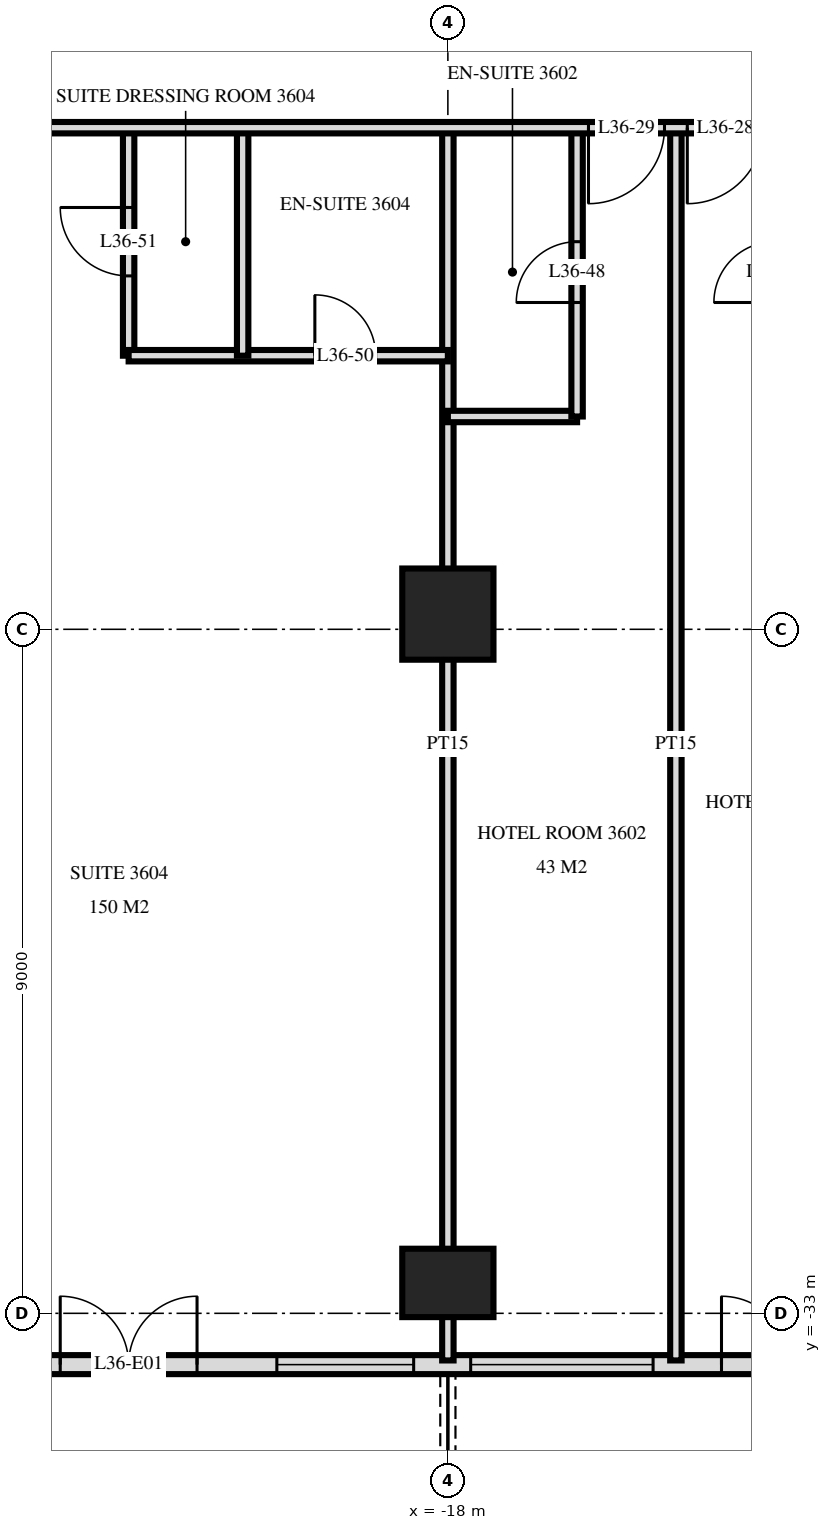
"""IFC4 building model, lengths in metres.
Left out: names, types, materials, properties, quantities, classifications, styles, units other than length and angle.
Written with IfcOpenShell. Run it as: python <this file> out.ifc"""

import sys

from ifc_helpers import new_model, si_unit, direction, frame, frame_2d, origin, origin_2d, place, context, subcontext, project, spatial, rectangle, extrude, element, fill, save


model = new_model("IFC4")
c1 = context("Model", 3, precision=1e-05, world=origin(), true_north=direction((0.0, 1.0)))
c2 = subcontext(c1, "Body", "Model", "MODEL_VIEW")
j1 = project(units=[si_unit("LENGTHUNIT", "METRE"), si_unit("PLANEANGLEUNIT", "RADIAN")], contexts=[c1])
p1 = place(None, origin())
s1 = spatial("IfcSite", under=j1, at=p1, CompositionType="ELEMENT")
p2 = place(p1, origin())
s2 = spatial("IfcBuilding", under=s1, at=p2, CompositionType="ELEMENT")
p3 = place(p2, frame((0.0, 0.0, 141.6)))
s3 = spatial("IfcBuildingStorey", under=s2, at=p3, CompositionType="ELEMENT", Elevation=141.6)
p4 = place(p3, frame((-18.0, -32.6, 0.0), z_axis=(0.0, 0.0, 1.0), x_axis=(1.0, 0.0, 0.0)))
e1 = element("IfcColumn", 1, at=p4, inside=s3, PredefinedType="COLUMN", context=c2, shape_type="SweptSolid", body=[
    extrude(rectangle(XDim=1.2, YDim=0.9, at=origin_2d()), origin(), (0.0, 0.0, 1.0), 3.6),
])
p5 = place(p3, frame((-18.0, -23.8, 0.0), z_axis=(0.0, 0.0, 1.0), x_axis=(1.0, 0.0, 0.0)))
e2 = element("IfcColumn", 2, at=p5, inside=s3, PredefinedType="COLUMN", context=c2, shape_type="SweptSolid", body=[
    extrude(rectangle(XDim=1.2, YDim=1.2, at=origin_2d()), origin(), (0.0, 0.0, 1.0), 3.6),
])
p6 = place(p3, frame((-23.675, -33.675, 0.0), z_axis=(0.0, 0.0, 1.0), x_axis=(1.0, 0.0, 0.0)))
e3 = element("IfcWall", 3, at=p6, inside=s3, PredefinedType="SOLIDWALL", context=c2, shape_type="SweptSolid", body=[
    extrude(rectangle(XDim=47.351, YDim=0.25, at=frame_2d((23.675, 0.0))), origin(), (0.0, 0.0, 1.0), 3.32),
])
p7 = place(p6, frame((0.575, 0.0, 0.0)))
e4 = element("IfcOpeningElement", 4, at=p7, cuts=e3, PredefinedType="OPENING", context=c2, shape_type="SweptSolid", body=[
    extrude(rectangle(XDim=1.8, YDim=2.4, at=frame_2d((0.9, 1.2))), frame((0.0, 0.135, 0.0), z_axis=(0.0, -1.0, 0.0), x_axis=(1.0, 0.0, 0.0)), (0.0, 0.0, 1.0), 0.27),
])
p8 = place(p6, frame((3.425, 0.0, 0.3)))
e5 = element("IfcOpeningElement", 5, at=p8, cuts=e3, PredefinedType="OPENING", context=c2, shape_type="SweptSolid", body=[
    extrude(rectangle(XDim=1.8, YDim=2.1, at=frame_2d((0.9, 1.05))), frame((0.0, 0.135, 0.0), z_axis=(0.0, -1.0, 0.0), x_axis=(1.0, 0.0, 0.0)), (0.0, 0.0, 1.0), 0.27),
])
p9 = place(p6, frame((5.975, 0.0, 0.3)))
e6 = element("IfcOpeningElement", 6, at=p9, cuts=e3, PredefinedType="OPENING", context=c2, shape_type="SweptSolid", body=[
    extrude(rectangle(XDim=2.4, YDim=2.1, at=frame_2d((1.2, 1.05))), frame((0.0, 0.135, 0.0), z_axis=(0.0, -1.0, 0.0), x_axis=(1.0, 0.0, 0.0)), (0.0, 0.0, 1.0), 0.27),
])
p10 = place(p6, frame((9.275, 0.0, 0.0)))
e7 = element("IfcOpeningElement", 7, at=p10, cuts=e3, PredefinedType="OPENING", context=c2, shape_type="SweptSolid", body=[
    extrude(rectangle(XDim=1.8, YDim=2.4, at=frame_2d((0.9, 1.2))), frame((0.0, 0.135, 0.0), z_axis=(0.0, -1.0, 0.0), x_axis=(1.0, 0.0, 0.0)), (0.0, 0.0, 1.0), 0.27),
])
p11 = place(p6, frame((12.275, 0.0, 0.0)))
e8 = element("IfcOpeningElement", 8, at=p11, cuts=e3, PredefinedType="OPENING", context=c2, shape_type="SweptSolid", body=[
    extrude(rectangle(XDim=1.8, YDim=2.4, at=frame_2d((0.9, 1.2))), frame((0.0, 0.135, 0.0), z_axis=(0.0, -1.0, 0.0), x_axis=(1.0, 0.0, 0.0)), (0.0, 0.0, 1.0), 0.27),
])
p12 = place(p6, frame((14.975, 0.0, 0.3)))
e9 = element("IfcOpeningElement", 9, at=p12, cuts=e3, PredefinedType="OPENING", context=c2, shape_type="SweptSolid", body=[
    extrude(rectangle(XDim=2.4, YDim=2.1, at=frame_2d((1.2, 1.05))), frame((0.0, 0.135, 0.0), z_axis=(0.0, -1.0, 0.0), x_axis=(1.0, 0.0, 0.0)), (0.0, 0.0, 1.0), 0.27),
])
p13 = place(p6, frame((17.975, 0.0, 0.3)))
e10 = element("IfcOpeningElement", 10, at=p13, cuts=e3, PredefinedType="OPENING", context=c2, shape_type="SweptSolid", body=[
    extrude(rectangle(XDim=2.4, YDim=2.1, at=frame_2d((1.2, 1.05))), frame((0.0, 0.135, 0.0), z_axis=(0.0, -1.0, 0.0), x_axis=(1.0, 0.0, 0.0)), (0.0, 0.0, 1.0), 0.27),
])
p14 = place(p6, frame((21.275, 0.0, 0.0)))
e11 = element("IfcOpeningElement", 11, at=p14, cuts=e3, PredefinedType="OPENING", context=c2, shape_type="SweptSolid", body=[
    extrude(rectangle(XDim=1.8, YDim=2.4, at=frame_2d((0.9, 1.2))), frame((0.0, 0.135, 0.0), z_axis=(0.0, -1.0, 0.0), x_axis=(1.0, 0.0, 0.0)), (0.0, 0.0, 1.0), 0.27),
])
p15 = place(p6, frame((24.275, 0.0, 0.0)))
e12 = element("IfcOpeningElement", 12, at=p15, cuts=e3, PredefinedType="OPENING", context=c2, shape_type="SweptSolid", body=[
    extrude(rectangle(XDim=1.8, YDim=2.4, at=frame_2d((0.9, 1.2))), frame((0.0, 0.135, 0.0), z_axis=(0.0, -1.0, 0.0), x_axis=(1.0, 0.0, 0.0)), (0.0, 0.0, 1.0), 0.27),
])
p16 = place(p6, frame((26.975, 0.0, 0.3)))
e13 = element("IfcOpeningElement", 13, at=p16, cuts=e3, PredefinedType="OPENING", context=c2, shape_type="SweptSolid", body=[
    extrude(rectangle(XDim=2.4, YDim=2.1, at=frame_2d((1.2, 1.05))), frame((0.0, 0.135, 0.0), z_axis=(0.0, -1.0, 0.0), x_axis=(1.0, 0.0, 0.0)), (0.0, 0.0, 1.0), 0.27),
])
p17 = place(p6, frame((30.275, 0.0, 0.0)))
e14 = element("IfcOpeningElement", 14, at=p17, cuts=e3, PredefinedType="OPENING", context=c2, shape_type="SweptSolid", body=[
    extrude(rectangle(XDim=1.8, YDim=2.4, at=frame_2d((0.9, 1.2))), frame((0.0, 0.135, 0.0), z_axis=(0.0, -1.0, 0.0), x_axis=(1.0, 0.0, 0.0)), (0.0, 0.0, 1.0), 0.27),
])
p18 = place(p6, frame((32.975, 0.0, 0.3)))
e15 = element("IfcOpeningElement", 15, at=p18, cuts=e3, PredefinedType="OPENING", context=c2, shape_type="SweptSolid", body=[
    extrude(rectangle(XDim=2.4, YDim=2.1, at=frame_2d((1.2, 1.05))), frame((0.0, 0.135, 0.0), z_axis=(0.0, -1.0, 0.0), x_axis=(1.0, 0.0, 0.0)), (0.0, 0.0, 1.0), 0.27),
])
p19 = place(p6, frame((36.275, 0.0, 0.0)))
e16 = element("IfcOpeningElement", 16, at=p19, cuts=e3, PredefinedType="OPENING", context=c2, shape_type="SweptSolid", body=[
    extrude(rectangle(XDim=1.8, YDim=2.4, at=frame_2d((0.9, 1.2))), frame((0.0, 0.135, 0.0), z_axis=(0.0, -1.0, 0.0), x_axis=(1.0, 0.0, 0.0)), (0.0, 0.0, 1.0), 0.27),
])
p20 = place(p6, frame((38.975, 0.0, 0.3)))
e17 = element("IfcOpeningElement", 17, at=p20, cuts=e3, PredefinedType="OPENING", context=c2, shape_type="SweptSolid", body=[
    extrude(rectangle(XDim=2.4, YDim=2.1, at=frame_2d((1.2, 1.05))), frame((0.0, 0.135, 0.0), z_axis=(0.0, -1.0, 0.0), x_axis=(1.0, 0.0, 0.0)), (0.0, 0.0, 1.0), 0.27),
])
p21 = place(p6, frame((42.275, 0.0, 0.0)))
e18 = element("IfcOpeningElement", 18, at=p21, cuts=e3, PredefinedType="OPENING", context=c2, shape_type="SweptSolid", body=[
    extrude(rectangle(XDim=1.8, YDim=2.4, at=frame_2d((0.9, 1.2))), frame((0.0, 0.135, 0.0), z_axis=(0.0, -1.0, 0.0), x_axis=(1.0, 0.0, 0.0)), (0.0, 0.0, 1.0), 0.27),
])
p22 = place(p6, frame((45.125, 0.0, 0.3)))
e19 = element("IfcOpeningElement", 19, at=p22, cuts=e3, PredefinedType="OPENING", context=c2, shape_type="SweptSolid", body=[
    extrude(rectangle(XDim=1.8, YDim=2.1, at=frame_2d((0.9, 1.05))), frame((0.0, 0.135, 0.0), z_axis=(0.0, -1.0, 0.0), x_axis=(1.0, 0.0, 0.0)), (0.0, 0.0, 1.0), 0.27),
])
p23 = place(p3, frame((-15.0, -33.62, 0.0), z_axis=(0.0, 0.0, 1.0), x_axis=(0.0, 1.0, 0.0)))
e20 = element("IfcWall", 20, at=p23, inside=s3, PredefinedType="PARTITIONING", context=c2, shape_type="SweptSolid", body=[
    extrude(rectangle(XDim=16.22, YDim=0.15, at=frame_2d((8.11, 0.0))), origin(), (0.0, 0.0, 1.0), 3.32),
])
p24 = place(p3, frame((-16.3, -21.2, 0.0), z_axis=(0.0, 0.0, 1.0), x_axis=(0.0, 1.0, 0.0)))
e21 = element("IfcWall", 21, at=p24, inside=s3, PredefinedType="PARTITIONING", context=c2, shape_type="SweptSolid", body=[
    extrude(rectangle(XDim=3.8, YDim=0.15, at=frame_2d((1.9, 0.0))), origin(), (0.0, 0.0, 1.0), 3.32),
])
p25 = place(p24, frame((1.5, 0.0, 0.0)))
e22 = element("IfcOpeningElement", 22, at=p25, cuts=e21, PredefinedType="OPENING", context=c2, shape_type="SweptSolid", body=[
    extrude(rectangle(XDim=0.8, YDim=2.1, at=frame_2d((0.4, 1.05))), frame((0.0, 0.085, 0.0), z_axis=(0.0, -1.0, 0.0), x_axis=(1.0, 0.0, 0.0)), (0.0, 0.0, 1.0), 0.17),
])
p26 = place(p3, frame((-18.0, -33.62, 0.0), z_axis=(0.0, 0.0, 1.0), x_axis=(0.0, 1.0, 0.0)))
e23 = element("IfcWall", 23, at=p26, inside=s3, PredefinedType="PARTITIONING", context=c2, shape_type="SweptSolid", body=[
    extrude(rectangle(XDim=16.22, YDim=0.15, at=frame_2d((8.11, 0.0))), origin(), (0.0, 0.0, 1.0), 3.32),
])
p27 = place(p3, frame((-20.7, -20.4, 0.0), z_axis=(0.0, 0.0, 1.0), x_axis=(0.0, 1.0, 0.0)))
e24 = element("IfcWall", 24, at=p27, inside=s3, PredefinedType="PARTITIONING", context=c2, shape_type="SweptSolid", body=[
    extrude(rectangle(XDim=3.0, YDim=0.15, at=frame_2d((1.5, 0.0))), origin(), (0.0, 0.0, 1.0), 3.32),
])
p28 = place(p3, frame((-22.2, -20.4, 0.0), z_axis=(0.0, 0.0, 1.0), x_axis=(0.0, 1.0, 0.0)))
e25 = element("IfcWall", 25, at=p28, inside=s3, PredefinedType="PARTITIONING", context=c2, shape_type="SweptSolid", body=[
    extrude(rectangle(XDim=3.0, YDim=0.15, at=frame_2d((1.5, 0.0))), origin(), (0.0, 0.0, 1.0), 3.32),
])
p29 = place(p28, frame((1.05, 0.0, 0.0)))
e26 = element("IfcOpeningElement", 26, at=p29, cuts=e25, PredefinedType="OPENING", context=c2, shape_type="SweptSolid", body=[
    extrude(rectangle(XDim=0.9, YDim=2.1, at=frame_2d((0.45, 1.05))), frame((0.0, 0.085, 0.0), z_axis=(0.0, -1.0, 0.0), x_axis=(1.0, 0.0, 0.0)), (0.0, 0.0, 1.0), 0.17),
])
p30 = place(p3, frame((-18.0, -21.2, 0.0), z_axis=(0.0, 0.0, 1.0), x_axis=(1.0, 0.0, 0.0)))
e27 = element("IfcWall", 27, at=p30, inside=s3, PredefinedType="PARTITIONING", context=c2, shape_type="SweptSolid", body=[
    extrude(rectangle(XDim=1.7, YDim=0.15, at=frame_2d((0.85, 0.0))), origin(), (0.0, 0.0, 1.0), 3.32),
])
p31 = place(p3, frame((-22.2, -20.4, 0.0), z_axis=(0.0, 0.0, 1.0), x_axis=(1.0, 0.0, 0.0)))
e28 = element("IfcWall", 28, at=p31, inside=s3, PredefinedType="PARTITIONING", context=c2, shape_type="SweptSolid", body=[
    extrude(rectangle(XDim=4.2, YDim=0.15, at=frame_2d((2.1, 0.0))), origin(), (0.0, 0.0, 1.0), 3.32),
])
p32 = place(p31, frame((2.45, 0.0, 0.0)))
e29 = element("IfcOpeningElement", 29, at=p32, cuts=e28, PredefinedType="OPENING", context=c2, shape_type="SweptSolid", body=[
    extrude(rectangle(XDim=0.8, YDim=2.1, at=frame_2d((0.4, 1.05))), frame((0.0, 0.085, 0.0), z_axis=(0.0, -1.0, 0.0), x_axis=(1.0, 0.0, 0.0)), (0.0, 0.0, 1.0), 0.17),
])
p33 = place(p3, frame((-28.02, -17.4, 0.0), z_axis=(0.0, 0.0, 1.0), x_axis=(1.0, 0.0, 0.0)))
e30 = element("IfcWall", 30, at=p33, inside=s3, PredefinedType="PARTITIONING", context=c2, shape_type="SweptSolid", body=[
    extrude(rectangle(XDim=56.04, YDim=0.15, at=frame_2d((28.02, 0.0))), origin(), (0.0, 0.0, 1.0), 3.32),
])
p34 = place(p33, frame((13.17, 0.0, 0.0)))
e31 = element("IfcOpeningElement", 31, at=p34, cuts=e30, PredefinedType="OPENING", context=c2, shape_type="SweptSolid", body=[
    extrude(rectangle(XDim=1.0, YDim=2.1, at=frame_2d((0.5, 1.05))), frame((0.0, 0.085, 0.0), z_axis=(0.0, -1.0, 0.0), x_axis=(1.0, 0.0, 0.0)), (0.0, 0.0, 1.0), 0.17),
])
p35 = place(p33, frame((11.87, 0.0, 0.0)))
e32 = element("IfcOpeningElement", 32, at=p35, cuts=e30, PredefinedType="OPENING", context=c2, shape_type="SweptSolid", body=[
    extrude(rectangle(XDim=1.0, YDim=2.1, at=frame_2d((0.5, 1.05))), frame((0.0, 0.085, 0.0), z_axis=(0.0, -1.0, 0.0), x_axis=(1.0, 0.0, 0.0)), (0.0, 0.0, 1.0), 0.17),
])
p36 = place(p33, frame((2.32, 0.0, 0.0)))
e33 = element("IfcOpeningElement", 33, at=p36, cuts=e30, PredefinedType="OPENING", context=c2, shape_type="SweptSolid", body=[
    extrude(rectangle(XDim=1.0, YDim=2.1, at=frame_2d((0.5, 1.05))), frame((0.0, 0.085, 0.0), z_axis=(0.0, -1.0, 0.0), x_axis=(1.0, 0.0, 0.0)), (0.0, 0.0, 1.0), 0.17),
])
p37 = place(p33, frame((40.17, 0.0, 0.0)))
e34 = element("IfcOpeningElement", 34, at=p37, cuts=e30, PredefinedType="OPENING", context=c2, shape_type="SweptSolid", body=[
    extrude(rectangle(XDim=1.0, YDim=2.1, at=frame_2d((0.5, 1.05))), frame((0.0, 0.085, 0.0), z_axis=(0.0, -1.0, 0.0), x_axis=(1.0, 0.0, 0.0)), (0.0, 0.0, 1.0), 0.17),
])
p38 = place(p33, frame((51.22, 0.0, 0.0)))
e35 = element("IfcOpeningElement", 35, at=p38, cuts=e30, PredefinedType="OPENING", context=c2, shape_type="SweptSolid", body=[
    extrude(rectangle(XDim=1.0, YDim=2.1, at=frame_2d((0.5, 1.05))), frame((0.0, 0.085, 0.0), z_axis=(0.0, -1.0, 0.0), x_axis=(1.0, 0.0, 0.0)), (0.0, 0.0, 1.0), 0.17),
])
p39 = place(p33, frame((18.52, 0.0, 0.0)))
e36 = element("IfcOpeningElement", 36, at=p39, cuts=e30, PredefinedType="OPENING", context=c2, shape_type="SweptSolid", body=[
    extrude(rectangle(XDim=1.0, YDim=2.1, at=frame_2d((0.5, 1.05))), frame((0.0, 0.085, 0.0), z_axis=(0.0, -1.0, 0.0), x_axis=(1.0, 0.0, 0.0)), (0.0, 0.0, 1.0), 0.17),
])
p40 = place(p33, frame((26.02, 0.0, 0.0)))
e37 = element("IfcOpeningElement", 37, at=p40, cuts=e30, PredefinedType="OPENING", context=c2, shape_type="SweptSolid", body=[
    extrude(rectangle(XDim=1.0, YDim=2.1, at=frame_2d((0.5, 1.05))), frame((0.0, 0.085, 0.0), z_axis=(0.0, -1.0, 0.0), x_axis=(1.0, 0.0, 0.0)), (0.0, 0.0, 1.0), 0.17),
])
p41 = place(p33, frame((35.02, 0.0, 0.0)))
e38 = element("IfcOpeningElement", 38, at=p41, cuts=e30, PredefinedType="OPENING", context=c2, shape_type="SweptSolid", body=[
    extrude(rectangle(XDim=1.0, YDim=2.1, at=frame_2d((0.5, 1.05))), frame((0.0, 0.085, 0.0), z_axis=(0.0, -1.0, 0.0), x_axis=(1.0, 0.0, 0.0)), (0.0, 0.0, 1.0), 0.17),
])
p42 = place(p7, origin())
e39 = element("IfcDoor", 39, at=p42, inside=s3, OperationType="DOUBLE_DOOR_SINGLE_SWING", PredefinedType="DOOR", context=c2, shape_type="SweptSolid", body=[
    extrude(rectangle(XDim=1.8, YDim=2.4, at=frame_2d((0.9, 1.2))), frame((0.0, 0.025, 0.0), z_axis=(0.0, -1.0, 0.0), x_axis=(1.0, 0.0, 0.0)), (0.0, 0.0, 1.0), 0.05),
])
fill(e4, e39)
p43 = place(p8, origin())
e40 = element("IfcWindow", 40, at=p43, inside=s3, PartitioningType="SINGLE_PANEL", PredefinedType="WINDOW", context=c2, shape_type="SweptSolid", body=[
    extrude(rectangle(XDim=1.8, YDim=2.1, at=frame_2d((0.9, 1.05))), frame((0.0, 0.03, 0.0), z_axis=(0.0, -1.0, 0.0), x_axis=(1.0, 0.0, 0.0)), (0.0, 0.0, 1.0), 0.06),
])
fill(e5, e40)
p44 = place(p9, origin())
e41 = element("IfcWindow", 41, at=p44, inside=s3, PartitioningType="SINGLE_PANEL", PredefinedType="WINDOW", context=c2, shape_type="SweptSolid", body=[
    extrude(rectangle(XDim=2.4, YDim=2.1, at=frame_2d((1.2, 1.05))), frame((0.0, 0.03, 0.0), z_axis=(0.0, -1.0, 0.0), x_axis=(1.0, 0.0, 0.0)), (0.0, 0.0, 1.0), 0.06),
])
fill(e6, e41)
p45 = place(p10, origin())
e42 = element("IfcDoor", 42, at=p45, inside=s3, OperationType="DOUBLE_DOOR_SINGLE_SWING", PredefinedType="DOOR", context=c2, shape_type="SweptSolid", body=[
    extrude(rectangle(XDim=1.8, YDim=2.4, at=frame_2d((0.9, 1.2))), frame((0.0, 0.025, 0.0), z_axis=(0.0, -1.0, 0.0), x_axis=(1.0, 0.0, 0.0)), (0.0, 0.0, 1.0), 0.05),
])
fill(e7, e42)
p46 = place(p34, frame((0.5, 0.0, 0.0), z_axis=(0.0, 0.0, 1.0), x_axis=(-1.0, 0.0, 0.0)))
e43 = element("IfcDoor", 43, at=p46, inside=s3, OperationType="SINGLE_SWING_LEFT", PredefinedType="DOOR", context=c2, shape_type="SweptSolid", body=[
    extrude(rectangle(XDim=1.0, YDim=2.1, at=frame_2d((0.0, 1.05))), frame((0.0, -0.025, 0.0), z_axis=(0.0, 1.0, 0.0), x_axis=(-1.0, 0.0, 0.0)), (0.0, 0.0, 1.0), 0.05),
])
fill(e31, e43)
p47 = place(p35, frame((0.5, 0.0, 0.0), z_axis=(0.0, 0.0, 1.0), x_axis=(-1.0, 0.0, 0.0)))
e44 = element("IfcDoor", 44, at=p47, inside=s3, OperationType="SINGLE_SWING_LEFT", PredefinedType="DOOR", context=c2, shape_type="SweptSolid", body=[
    extrude(rectangle(XDim=1.0, YDim=2.1, at=frame_2d((0.0, 1.05))), frame((0.0, -0.025, 0.0), z_axis=(0.0, 1.0, 0.0), x_axis=(-1.0, 0.0, 0.0)), (0.0, 0.0, 1.0), 0.05),
])
fill(e32, e44)
p48 = place(p25, origin())
e45 = element("IfcDoor", 45, at=p48, inside=s3, OperationType="SINGLE_SWING_RIGHT", PredefinedType="DOOR", context=c2, shape_type="SweptSolid", body=[
    extrude(rectangle(XDim=0.8, YDim=2.1, at=frame_2d((0.4, 1.05))), frame((0.0, 0.025, 0.0), z_axis=(0.0, -1.0, 0.0), x_axis=(1.0, 0.0, 0.0)), (0.0, 0.0, 1.0), 0.05),
])
fill(e22, e45)
p49 = place(p32, origin())
e46 = element("IfcDoor", 46, at=p49, inside=s3, OperationType="SINGLE_SWING_RIGHT", PredefinedType="DOOR", context=c2, shape_type="SweptSolid", body=[
    extrude(rectangle(XDim=0.8, YDim=2.1, at=frame_2d((0.4, 1.05))), frame((0.0, 0.025, 0.0), z_axis=(0.0, -1.0, 0.0), x_axis=(1.0, 0.0, 0.0)), (0.0, 0.0, 1.0), 0.05),
])
fill(e29, e46)
p50 = place(p29, origin())
e47 = element("IfcDoor", 47, at=p50, inside=s3, OperationType="SINGLE_SWING_LEFT", PredefinedType="DOOR", context=c2, shape_type="SweptSolid", body=[
    extrude(rectangle(XDim=0.9, YDim=2.1, at=frame_2d((0.45, 1.05))), frame((0.0, 0.025, 0.0), z_axis=(0.0, -1.0, 0.0), x_axis=(1.0, 0.0, 0.0)), (0.0, 0.0, 1.0), 0.05),
])
fill(e26, e47)
save(model, sys.argv[1])
